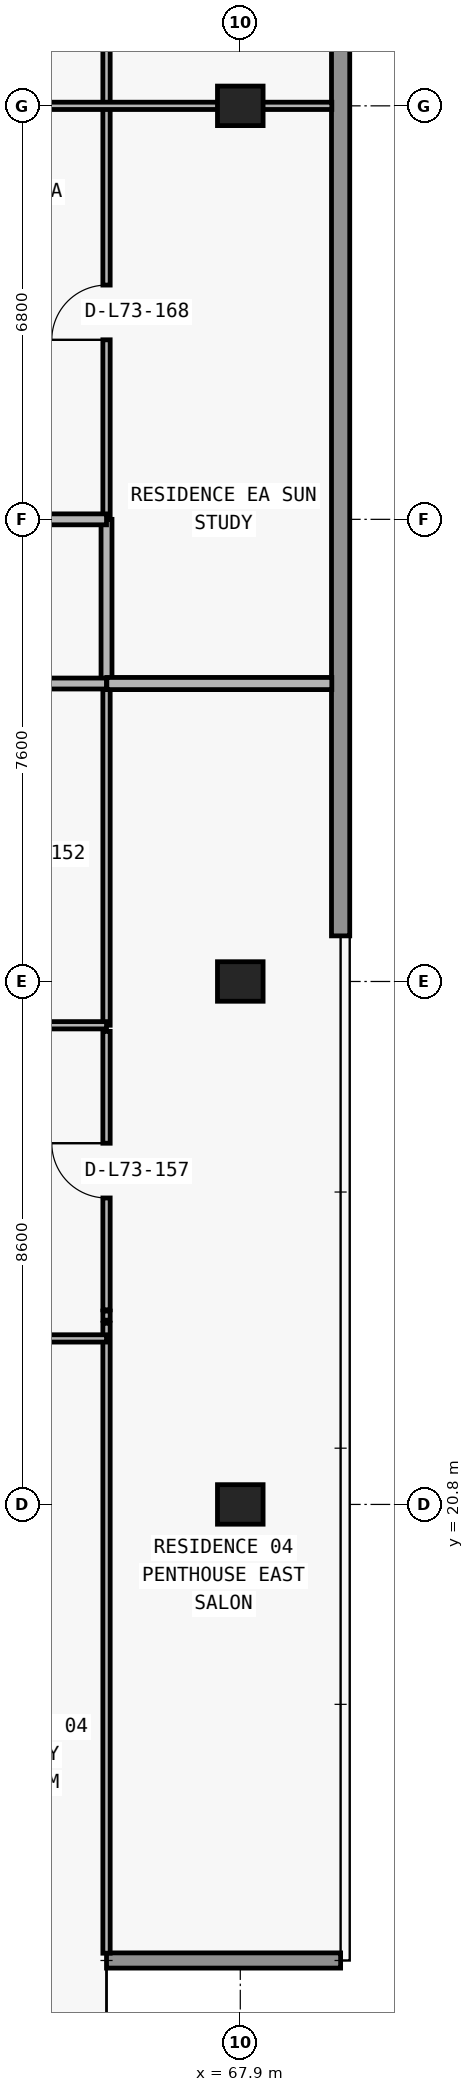
"""IFC4 building model, lengths in metres.
Left out: names, types, materials, properties, quantities, classifications, styles, units other than length and angle.
Written with IfcOpenShell. Run it as: python <this file> out.ifc"""

import sys

from ifc_helpers import new_model, si_unit, direction, frame, frame_2d, origin, origin_2d, place, context, subcontext, project, spatial, rectangle, extrude, element, fill, save


model = new_model("IFC4")
c1 = context("Model", 3, precision=1e-05, world=origin(), true_north=direction((0.0, 1.0)))
c2 = subcontext(c1, "Body", "Model", "MODEL_VIEW")
j1 = project(units=[si_unit("LENGTHUNIT", "METRE"), si_unit("PLANEANGLEUNIT", "RADIAN")], contexts=[c1])
p1 = place(None, origin())
s1 = spatial("IfcSite", under=j1, at=p1, CompositionType="ELEMENT")
p2 = place(p1, origin())
s2 = spatial("IfcBuilding", under=s1, at=p2, CompositionType="ELEMENT")
p3 = place(p2, frame((0.0, 0.0, 259.5)))
s3 = spatial("IfcBuildingStorey", under=s2, at=p3, CompositionType="ELEMENT", Elevation=259.5)
for number, where, z_axis, x_axis in (
    (1, (67.9, 20.8, 0.0), (0.0, 0.0, 1.0), (1.0, 0.0, 0.0)),
    (2, (67.9, 29.4, 0.0), (0.0, 0.0, 1.0), (1.0, 0.0, 0.0)),
    (3, (67.9, 43.8, 0.0), (0.0, 0.0, 1.0), (1.0, 0.0, 0.0)),
):
    element("IfcColumn", number, at=place(p3, frame(where, z_axis=z_axis, x_axis=x_axis)), inside=s3, PredefinedType="COLUMN", context=c2, shape_type="SweptSolid", body=[
        extrude(rectangle(XDim=0.75, YDim=0.65, at=origin_2d()), origin(), (0.0, 0.0, 1.0), 3.05),
    ])
p4 = place(p3, frame((65.7, 13.3, 0.0), z_axis=(0.0, 0.0, 1.0), x_axis=(1.0, 0.0, 0.0)))
e4 = element("IfcWall", 4, at=p4, inside=s3, PredefinedType="ELEMENTEDWALL", context=c2, shape_type="SweptSolid", body=[
    extrude(rectangle(XDim=3.85, YDim=0.25, at=frame_2d((1.925, 0.0))), origin(), (0.0, 0.0, 1.0), 3.05),
])
p5 = place(p3, frame((69.55, 47.0, 0.0), z_axis=(0.0, 0.0, 1.0), x_axis=(0.0, -1.0, 0.0)))
e5 = element("IfcWall", 5, at=p5, inside=s3, PredefinedType="STANDARD", context=c2, shape_type="SweptSolid", body=[
    extrude(rectangle(XDim=16.85, YDim=0.3, at=frame_2d((8.425, 0.0))), origin(), (0.0, 0.0, 1.0), 3.05),
])
p6 = place(p3, frame((65.7, 13.42, 0.0), z_axis=(0.0, 0.0, 1.0), x_axis=(0.0, 1.0, 0.0)))
e6 = element("IfcWall", 6, at=p6, inside=s3, PredefinedType="PARTITIONING", context=c2, shape_type="SweptSolid", body=[
    extrude(rectangle(XDim=10.36, YDim=0.12, at=frame_2d((5.18, 0.0))), origin(), (0.0, 0.0, 1.0), 2.629),
])
p7 = place(p3, frame((65.7, 23.83, 0.0), z_axis=(0.0, 0.0, 1.0), x_axis=(0.0, 1.0, 0.0)))
e7 = element("IfcWall", 7, at=p7, inside=s3, PredefinedType="PARTITIONING", context=c2, shape_type="SweptSolid", body=[
    extrude(rectangle(XDim=0.15, YDim=0.12, at=frame_2d((0.075, 0.0))), origin(), (0.0, 0.0, 1.0), 2.629),
])
p8 = place(p3, frame((65.7, 24.0, 0.0), z_axis=(0.0, 0.0, 1.0), x_axis=(0.0, 1.0, 0.0)))
e8 = element("IfcWall", 8, at=p8, inside=s3, PredefinedType="PARTITIONING", context=c2, shape_type="SweptSolid", body=[
    extrude(rectangle(XDim=4.58, YDim=0.12, at=frame_2d((2.29, 0.0))), origin(), (0.0, 0.0, 1.0), 2.629),
])
p9 = place(p8, frame((1.84, 0.0, 0.0)))
e9 = element("IfcOpeningElement", 9, at=p9, cuts=e8, PredefinedType="OPENING", context=c2, shape_type="SweptSolid", body=[
    extrude(rectangle(XDim=0.9, YDim=2.15, at=frame_2d((0.45, 1.075))), frame((0.0, 0.07, 0.0), z_axis=(0.0, -1.0, 0.0), x_axis=(1.0, 0.0, 0.0)), (0.0, 0.0, 1.0), 0.14),
])
p10 = place(p3, frame((65.7, 28.68, 0.0), z_axis=(0.0, 0.0, 1.0), x_axis=(0.0, 1.0, 0.0)))
e10 = element("IfcWall", 10, at=p10, inside=s3, PredefinedType="PARTITIONING", context=c2, shape_type="SweptSolid", body=[
    extrude(rectangle(XDim=5.62, YDim=0.12, at=frame_2d((2.81, 0.0))), origin(), (0.0, 0.0, 1.0), 2.629),
])
p11 = place(p3, frame((65.7, 34.305, 0.0), z_axis=(0.0, 0.0, 1.0), x_axis=(0.0, 1.0, 0.0)))
e11 = element("IfcWall", 11, at=p11, inside=s3, PredefinedType="PARTITIONING", context=c2, shape_type="SweptSolid", body=[
    extrude(rectangle(XDim=2.695, YDim=0.18, at=frame_2d((1.348, 0.0))), origin(), (0.0, 0.0, 1.0), 2.629),
])
p12 = place(p3, frame((65.7, 37.005, 0.0), z_axis=(0.0, 0.0, 1.0), x_axis=(0.0, 1.0, 0.0)))
e12 = element("IfcWall", 12, at=p12, inside=s3, PredefinedType="PARTITIONING", context=c2, shape_type="SweptSolid", body=[
    extrude(rectangle(XDim=9.875, YDim=0.12, at=frame_2d((4.938, 0.0))), origin(), (0.0, 0.0, 1.0), 2.629),
])
p13 = place(p12, frame((2.948, 0.0, 0.0)))
e13 = element("IfcOpeningElement", 13, at=p13, cuts=e12, PredefinedType="OPENING", context=c2, shape_type="SweptSolid", body=[
    extrude(rectangle(XDim=0.9, YDim=2.15, at=frame_2d((0.45, 1.075))), frame((0.0, 0.07, 0.0), z_axis=(0.0, -1.0, 0.0), x_axis=(1.0, 0.0, 0.0)), (0.0, 0.0, 1.0), 0.14),
])
p14 = place(p12, frame((7.885, 0.0, 0.0)))
e14 = element("IfcOpeningElement", 14, at=p14, cuts=e12, PredefinedType="OPENING", context=c2, shape_type="SweptSolid", body=[
    extrude(rectangle(XDim=0.9, YDim=2.15, at=frame_2d((0.45, 1.075))), frame((0.0, 0.07, 0.0), z_axis=(0.0, -1.0, 0.0), x_axis=(1.0, 0.0, 0.0)), (0.0, 0.0, 1.0), 0.14),
])
p15 = place(p3, frame((59.5, 23.53, 0.0), z_axis=(0.0, 0.0, 1.0), x_axis=(1.0, 0.0, 0.0)))
e15 = element("IfcWall", 15, at=p15, inside=s3, PredefinedType="PARTITIONING", context=c2, shape_type="SweptSolid", body=[
    extrude(rectangle(XDim=6.2, YDim=0.12, at=frame_2d((3.1, 0.0))), origin(), (0.0, 0.0, 1.0), 3.05),
])
p16 = place(p15, frame((1.2, 0.0, 0.0)))
e16 = element("IfcOpeningElement", 16, at=p16, cuts=e15, PredefinedType="OPENING", context=c2, shape_type="SweptSolid", body=[
    extrude(rectangle(XDim=0.9, YDim=2.15, at=frame_2d((0.45, 1.075))), frame((0.0, 0.07, 0.0), z_axis=(0.0, -1.0, 0.0), x_axis=(1.0, 0.0, 0.0)), (0.0, 0.0, 1.0), 0.14),
])
p17 = place(p15, frame((4.3, 0.0, 0.0)))
e17 = element("IfcOpeningElement", 17, at=p17, cuts=e15, PredefinedType="OPENING", context=c2, shape_type="SweptSolid", body=[
    extrude(rectangle(XDim=0.9, YDim=2.15, at=frame_2d((0.45, 1.075))), frame((0.0, 0.07, 0.0), z_axis=(0.0, -1.0, 0.0), x_axis=(1.0, 0.0, 0.0)), (0.0, 0.0, 1.0), 0.14),
])
p18 = place(p3, frame((59.5, 28.68, 0.0), z_axis=(0.0, 0.0, 1.0), x_axis=(1.0, 0.0, 0.0)))
e18 = element("IfcWall", 18, at=p18, inside=s3, PredefinedType="PARTITIONING", context=c2, shape_type="SweptSolid", body=[
    extrude(rectangle(XDim=6.2, YDim=0.12, at=frame_2d((3.1, 0.0))), origin(), (0.0, 0.0, 1.0), 3.05),
])
p19 = place(p18, frame((1.796, 0.0, 0.0)))
e19 = element("IfcOpeningElement", 19, at=p19, cuts=e18, PredefinedType="OPENING", context=c2, shape_type="SweptSolid", body=[
    extrude(rectangle(XDim=0.9, YDim=2.15, at=frame_2d((0.45, 1.075))), frame((0.0, 0.07, 0.0), z_axis=(0.0, -1.0, 0.0), x_axis=(1.0, 0.0, 0.0)), (0.0, 0.0, 1.0), 0.14),
])
p20 = place(p3, frame((12.105, 34.3, 0.0), z_axis=(0.0, 0.0, 1.0), x_axis=(1.0, 0.0, 0.0)))
e20 = element("IfcWall", 20, at=p20, inside=s3, PredefinedType="PARTITIONING", context=c2, shape_type="SweptSolid", body=[
    extrude(rectangle(XDim=53.595, YDim=0.18, at=frame_2d((26.797, 0.0))), origin(), (0.0, 0.0, 1.0), 3.05),
])
p21 = place(p20, frame((1.661, 0.0, 0.0)))
e21 = element("IfcOpeningElement", 21, at=p21, cuts=e20, PredefinedType="OPENING", context=c2, shape_type="SweptSolid", body=[
    extrude(rectangle(XDim=1.0, YDim=2.2, at=frame_2d((0.5, 1.1))), frame((0.0, 0.1, 0.0), z_axis=(0.0, -1.0, 0.0), x_axis=(1.0, 0.0, 0.0)), (0.0, 0.0, 1.0), 0.2),
])
p22 = place(p20, frame((17.438, 0.0, 0.0)))
e22 = element("IfcOpeningElement", 22, at=p22, cuts=e20, PredefinedType="OPENING", context=c2, shape_type="SweptSolid", body=[
    extrude(rectangle(XDim=1.0, YDim=2.2, at=frame_2d((0.5, 1.1))), frame((0.0, 0.1, 0.0), z_axis=(0.0, -1.0, 0.0), x_axis=(1.0, 0.0, 0.0)), (0.0, 0.0, 1.0), 0.2),
])
p23 = place(p20, frame((41.727, 0.0, 0.0)))
e23 = element("IfcOpeningElement", 23, at=p23, cuts=e20, PredefinedType="OPENING", context=c2, shape_type="SweptSolid", body=[
    extrude(rectangle(XDim=1.0, YDim=2.2, at=frame_2d((0.5, 1.1))), frame((0.0, 0.1, 0.0), z_axis=(0.0, -1.0, 0.0), x_axis=(1.0, 0.0, 0.0)), (0.0, 0.0, 1.0), 0.2),
])
p24 = place(p20, frame((49.141, 0.0, 0.0)))
e24 = element("IfcOpeningElement", 24, at=p24, cuts=e20, PredefinedType="OPENING", context=c2, shape_type="SweptSolid", body=[
    extrude(rectangle(XDim=1.0, YDim=2.2, at=frame_2d((0.5, 1.1))), frame((0.0, 0.1, 0.0), z_axis=(0.0, -1.0, 0.0), x_axis=(1.0, 0.0, 0.0)), (0.0, 0.0, 1.0), 0.2),
])
p25 = place(p3, frame((65.705, 34.3, 0.0), z_axis=(0.0, 0.0, 1.0), x_axis=(1.0, 0.0, 0.0)))
e25 = element("IfcWall", 25, at=p25, inside=s3, PredefinedType="PARTITIONING", context=c2, shape_type="SweptSolid", body=[
    extrude(rectangle(XDim=3.7, YDim=0.2, at=frame_2d((1.85, 0.0))), origin(), (0.0, 0.0, 1.0), 3.05),
])
p26 = place(p3, frame((59.855, 37.0, 0.0), z_axis=(0.0, 0.0, 1.0), x_axis=(1.0, 0.0, 0.0)))
e26 = element("IfcWall", 26, at=p26, inside=s3, PredefinedType="PARTITIONING", context=c2, shape_type="SweptSolid", body=[
    extrude(rectangle(XDim=5.845, YDim=0.18, at=frame_2d((2.922, 0.0))), origin(), (0.0, 0.0, 1.0), 3.05),
])
p27 = place(p26, frame((3.57, 0.0, 0.0)))
e27 = element("IfcOpeningElement", 27, at=p27, cuts=e26, PredefinedType="OPENING", context=c2, shape_type="SweptSolid", body=[
    extrude(rectangle(XDim=1.0, YDim=2.2, at=frame_2d((0.5, 1.1))), frame((0.0, 0.1, 0.0), z_axis=(0.0, -1.0, 0.0), x_axis=(1.0, 0.0, 0.0)), (0.0, 0.0, 1.0), 0.2),
])
p28 = place(p3, frame((59.845, 43.8, 0.0), z_axis=(0.0, 0.0, 1.0), x_axis=(1.0, 0.0, 0.0)))
e28 = element("IfcWall", 28, at=p28, inside=s3, PredefinedType="PARTITIONING", context=c2, shape_type="SweptSolid", body=[
    extrude(rectangle(XDim=9.56, YDim=0.12, at=frame_2d((4.78, 0.0))), origin(), (0.0, 0.0, 1.0), 2.418),
])
p29 = place(p28, frame((3.63, 0.0, 0.0)))
e29 = element("IfcOpeningElement", 29, at=p29, cuts=e28, PredefinedType="OPENING", context=c2, shape_type="SweptSolid", body=[
    extrude(rectangle(XDim=0.9, YDim=2.15, at=frame_2d((0.45, 1.075))), frame((0.0, 0.07, 0.0), z_axis=(0.0, -1.0, 0.0), x_axis=(1.0, 0.0, 0.0)), (0.0, 0.0, 1.0), 0.14),
])
p30 = place(p28, frame((0.728, 0.0, 0.0)))
e30 = element("IfcOpeningElement", 30, at=p30, cuts=e28, PredefinedType="OPENING", context=c2, shape_type="SweptSolid", body=[
    extrude(rectangle(XDim=0.85, YDim=2.1, at=frame_2d((0.425, 1.05))), frame((0.0, 0.07, 0.0), z_axis=(0.0, -1.0, 0.0), x_axis=(1.0, 0.0, 0.0)), (0.0, 0.0, 1.0), 0.14),
])
p31 = place(p9, origin())
e31 = element("IfcDoor", 31, at=p31, inside=s3, OperationType="SINGLE_SWING_RIGHT", PredefinedType="DOOR", context=c2, shape_type="SweptSolid", body=[
    extrude(rectangle(XDim=0.9, YDim=2.15, at=frame_2d((0.45, 1.075))), frame((0.0, 0.025, 0.0), z_axis=(0.0, -1.0, 0.0), x_axis=(1.0, 0.0, 0.0)), (0.0, 0.0, 1.0), 0.05),
])
fill(e9, e31)
p32 = place(p13, origin())
e32 = element("IfcDoor", 32, at=p32, inside=s3, OperationType="SINGLE_SWING_LEFT", PredefinedType="DOOR", context=c2, shape_type="SweptSolid", body=[
    extrude(rectangle(XDim=0.9, YDim=2.15, at=frame_2d((0.45, 1.075))), frame((0.0, 0.025, 0.0), z_axis=(0.0, -1.0, 0.0), x_axis=(1.0, 0.0, 0.0)), (0.0, 0.0, 1.0), 0.05),
])
fill(e13, e32)
save(model, sys.argv[1])
